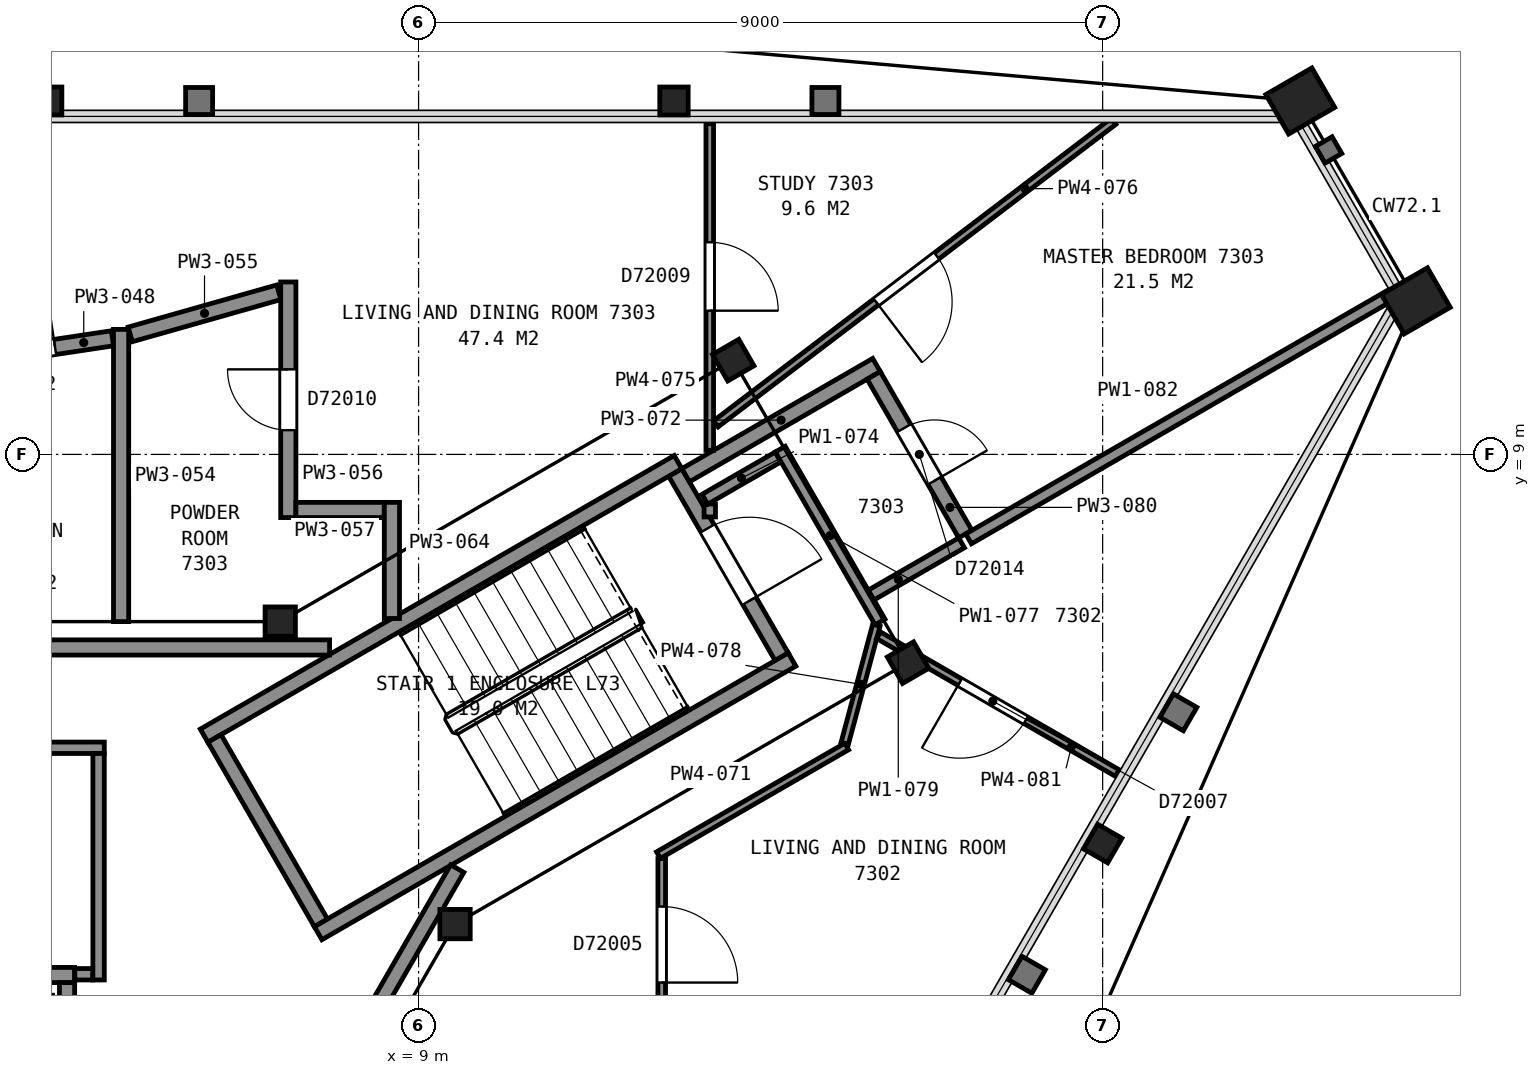
"""IFC4 building model, lengths in metres.
Left out: names, types, materials, properties, quantities, classifications, styles, units other than length and angle.
Written with IfcOpenShell. Run it as: python <this file> out.ifc"""

import sys

from ifc_helpers import new_model, si_unit, direction, frame, frame_2d, origin, origin_2d, place, context, subcontext, project, spatial, rectangle, hollow_rectangle, i_section, extrude, element, fill, save


model = new_model("IFC4")
c1 = context("Model", 3, precision=1e-05, world=origin(), true_north=direction((0.0, 1.0)))
c2 = subcontext(c1, "Body", "Model", "MODEL_VIEW")
j1 = project(units=[si_unit("LENGTHUNIT", "METRE"), si_unit("PLANEANGLEUNIT", "RADIAN")], contexts=[c1])
p1 = place(None, origin())
s1 = spatial("IfcSite", under=j1, at=p1, CompositionType="ELEMENT")
p2 = place(p1, origin())
s2 = spatial("IfcBuilding", under=s1, at=p2, CompositionType="ELEMENT")
p3 = place(p2, frame((0.0, 0.0, 289.9)))
s3 = spatial("IfcBuildingStorey", under=s2, at=p3, CompositionType="ELEMENT", Elevation=289.9)
p4 = place(p3, frame((20.6, 13.65, 0.0), z_axis=(0.0, 0.0, 1.0), x_axis=(0.5, -0.866025403784, 0.0)))
e1 = element("IfcColumn", 1, at=p4, inside=s3, PredefinedType="COLUMN", context=c2, shape_type="SweptSolid", body=[
    extrude(hollow_rectangle(XDim=0.6, YDim=0.7, WallThickness=0.04, at=origin_2d()), origin(), (0.0, 0.0, 1.0), 3.7),
])
for number, where, z_axis, x_axis in (
    (2, (12.36, 13.65, 0.0), (0.0, 0.0, 1.0), (1.0, 0.0, 0.0)),
    (3, (4.12, 13.65, 0.0), (0.0, 0.0, 1.0), (1.0, 0.0, 0.0)),
    (4, (18.0, 3.88, 0.0), (0.0, 0.0, 1.0), (-0.5, -0.866, 0.0)),
):
    element("IfcColumn", number, at=place(p3, frame(where, z_axis=z_axis, x_axis=x_axis)), inside=s3, PredefinedType="COLUMN", context=c2, shape_type="SweptSolid", body=[
        extrude(i_section(OverallWidth=0.373, OverallDepth=0.368, WebThickness=0.015, FlangeThickness=0.024, FilletRadius=0.015, at=origin_2d()), origin(), (0.0, 0.0, 1.0), 3.7),
    ])
p5 = place(p3, frame((22.12, 11.02, 0.0), z_axis=(0.0, 0.0, 1.0), x_axis=(0.5, -0.866025403784, 0.0)))
e5 = element("IfcColumn", 5, at=p5, inside=s3, PredefinedType="COLUMN", context=c2, shape_type="SweptSolid", body=[
    extrude(hollow_rectangle(XDim=0.6, YDim=0.7, WallThickness=0.04, at=origin_2d()), origin(), (0.0, 0.0, 1.0), 3.7),
])
p6 = place(p3, frame((9.48, 2.82, 0.0), z_axis=(0.0, 0.0, 1.0), x_axis=(1.0, 0.0, 0.0)))
e6 = element("IfcColumn", 6, at=p6, inside=s3, PredefinedType="COLUMN", context=c2, shape_type="SweptSolid", body=[
    extrude(i_section(OverallWidth=0.399, OverallDepth=0.386, WebThickness=0.021, FlangeThickness=0.033, FilletRadius=0.015, at=origin_2d()), origin(), (0.0, 0.0, 1.0), 3.7),
])
for number, where, z_axis, x_axis in (
    (7, (15.44, 6.26, 0.0), (0.0, 0.0, 1.0), (0.5, -0.866, 0.0)),
    (8, (13.14, 10.24, 0.0), (0.0, 0.0, 1.0), (0.5, -0.866, 0.0)),
):
    element("IfcColumn", number, at=place(p3, frame(where, z_axis=z_axis, x_axis=x_axis)), inside=s3, PredefinedType="COLUMN", context=c2, shape_type="SweptSolid", body=[
        extrude(i_section(OverallWidth=0.401, OverallDepth=0.399, WebThickness=0.025, FlangeThickness=0.04, FilletRadius=0.015, at=origin_2d()), origin(), (0.0, 0.0, 1.0), 3.7),
    ])
p7 = place(p3, frame((7.18, 6.8, 0.0), z_axis=(0.0, 0.0, 1.0), x_axis=(1.0, 0.0, 0.0)))
e9 = element("IfcColumn", 9, at=p7, inside=s3, PredefinedType="COLUMN", context=c2, shape_type="SweptSolid", body=[
    extrude(i_section(OverallWidth=0.399, OverallDepth=0.386, WebThickness=0.021, FlangeThickness=0.033, FilletRadius=0.015, at=origin_2d()), origin(), (0.0, 0.0, 1.0), 3.7),
])
p8 = place(p3, frame((13.777, 6.338, 0.0), z_axis=(0.0, 0.0, 1.0), x_axis=(-0.500049511043, 0.865996816683, 0.0)))
e10 = element("IfcWall", 10, at=p8, inside=s3, PredefinedType="PARTITIONING", context=c2, shape_type="SweptSolid", body=[
    extrude(rectangle(XDim=2.8, YDim=0.2, at=frame_2d((1.4, 0.0))), origin(), (0.0, 0.0, 1.0), 3.45),
])
p9 = place(p8, frame((0.85, 0.0, 0.0)))
e11 = element("IfcOpeningElement", 11, at=p9, cuts=e10, PredefinedType="OPENING", context=c2, shape_type="SweptSolid", body=[
    extrude(rectangle(XDim=1.1, YDim=2.1, at=frame_2d((0.55, 1.05))), frame((0.0, 0.11, 0.0), z_axis=(0.0, -1.0, 0.0), x_axis=(1.0, 0.0, 0.0)), (0.0, 0.0, 1.0), 0.22),
])
for number, where, z_axis, x_axis in (
    (12, (6.178, 5.299, 0.0), (0.0, 0.0, 1.0), (0.866, 0.5, 0.0)),
    (13, (7.678, 2.701, 0.0), (0.0, 0.0, 1.0), (0.866, 0.5, 0.0)),
):
    element("IfcWall", number, at=place(p3, frame(where, z_axis=z_axis, x_axis=x_axis)), inside=s3, PredefinedType="PARTITIONING", context=c2, shape_type="SweptSolid", body=[
        extrude(rectangle(XDim=7.2, YDim=0.2, at=frame_2d((3.6, 0.0))), origin(), (0.0, 0.0, 1.0), 3.45),
    ])
p10 = place(p3, frame((7.715, 2.838, 0.0), z_axis=(0.0, 0.0, 1.0), x_axis=(-0.500049511043, 0.865996816683, 0.0)))
e14 = element("IfcWall", 14, at=p10, inside=s3, PredefinedType="PARTITIONING", context=c2, shape_type="SweptSolid", body=[
    extrude(rectangle(XDim=2.8, YDim=0.2, at=frame_2d((1.4, 0.0))), origin(), (0.0, 0.0, 1.0), 3.45),
])
p11 = place(p3, frame((1.525, 2.15, 0.0), z_axis=(0.0, 0.0, 1.0), x_axis=(1.0, 0.0, 0.0)))
e15 = element("IfcWall", 15, at=p11, inside=s3, PredefinedType="PARTITIONING", context=c2, shape_type="SweptSolid", body=[
    extrude(rectangle(XDim=2.95, YDim=0.2, at=frame_2d((1.475, 0.0))), origin(), (0.0, 0.0, 1.0), 3.7),
])
p12 = place(p11, frame((0.925, 0.0, 0.0)))
e16 = element("IfcOpeningElement", 16, at=p12, cuts=e15, PredefinedType="OPENING", context=c2, shape_type="SweptSolid", body=[
    extrude(rectangle(XDim=1.1, YDim=2.1, at=frame_2d((0.55, 1.05))), frame((0.0, 0.11, 0.0), z_axis=(0.0, -1.0, 0.0), x_axis=(1.0, 0.0, 0.0)), (0.0, 0.0, 1.0), 0.22),
])
p13 = place(p3, frame((4.375, 0.1, 0.0), z_axis=(0.0, 0.0, 1.0), x_axis=(0.0, 1.0, 0.0)))
e17 = element("IfcWall", 17, at=p13, inside=s3, PredefinedType="PARTITIONING", context=c2, shape_type="SweptSolid", body=[
    extrude(rectangle(XDim=1.95, YDim=0.2, at=frame_2d((0.975, 0.0))), origin(), (0.0, 0.0, 1.0), 3.7),
])
p14 = place(p3, frame((7.829, 6.46, 0.0), z_axis=(0.0, 0.0, 1.0), x_axis=(-1.0, 0.0, 0.0)))
e18 = element("IfcWall", 18, at=p14, inside=s3, PredefinedType="PARTITIONING", context=c2, shape_type="SweptSolid", body=[
    extrude(rectangle(XDim=15.658, YDim=0.2, at=frame_2d((7.829, 0.0))), origin(), (0.0, 0.0, 1.0), 3.45),
])
p15 = place(p14, frame((12.168, 0.0, 0.0)))
e19 = element("IfcOpeningElement", 19, at=p15, cuts=e18, PredefinedType="OPENING", context=c2, shape_type="SweptSolid", body=[
    extrude(rectangle(XDim=1.2, YDim=2.1, at=frame_2d((0.6, 1.05))), frame((0.0, 0.11, 0.0), z_axis=(0.0, -1.0, 0.0), x_axis=(1.0, 0.0, 0.0)), (0.0, 0.0, 1.0), 0.22),
])
p16 = place(p3, frame((-0.245, 5.14, 0.0), z_axis=(0.0, 0.0, 1.0), x_axis=(1.0, 0.0, 0.0)))
e20 = element("IfcWall", 20, at=p16, inside=s3, PredefinedType="PARTITIONING", context=c2, shape_type="SweptSolid", body=[
    extrude(rectangle(XDim=5.11, YDim=0.15, at=frame_2d((2.555, 0.0))), origin(), (0.0, 0.0, 1.0), 3.45),
])
p17 = place(p16, frame((1.975, 0.0, 0.0)))
e21 = element("IfcOpeningElement", 21, at=p17, cuts=e20, PredefinedType="OPENING", context=c2, shape_type="SweptSolid", body=[
    extrude(rectangle(XDim=1.0, YDim=2.1, at=frame_2d((0.5, 1.05))), frame((0.0, 0.085, 0.0), z_axis=(0.0, -1.0, 0.0), x_axis=(1.0, 0.0, 0.0)), (0.0, 0.0, 1.0), 0.17),
])
p18 = place(p3, frame((3.828, -6.29, 0.0), z_axis=(0.0, 0.0, 1.0), x_axis=(0.499979739078, 0.866037101117, 0.0)))
e22 = element("IfcWall", 22, at=p18, inside=s3, PredefinedType="PARTITIONING", context=c2, shape_type="SweptSolid", body=[
    extrude(rectangle(XDim=11.363, YDim=0.2, at=frame_2d((5.681, 0.0))), origin(), (0.0, 0.0, 1.0), 3.45),
])
p19 = place(p18, frame((0.55, 0.0, 0.0)))
e23 = element("IfcOpeningElement", 23, at=p19, cuts=e22, PredefinedType="OPENING", context=c2, shape_type="SweptSolid", body=[
    extrude(rectangle(XDim=1.2, YDim=2.1, at=frame_2d((0.6, 1.05))), frame((0.0, 0.11, 0.0), z_axis=(0.0, -1.0, 0.0), x_axis=(1.0, 0.0, 0.0)), (0.0, 0.0, 1.0), 0.22),
])
p20 = place(p3, frame((4.477, 2.16, 0.0), z_axis=(0.0, 0.0, 1.0), x_axis=(1.0, 0.0, 0.0)))
e24 = element("IfcWall", 24, at=p20, inside=s3, PredefinedType="PARTITIONING", context=c2, shape_type="SweptSolid", body=[
    extrude(rectangle(XDim=0.238, YDim=0.15, at=frame_2d((0.119, 0.0))), origin(), (0.0, 0.0, 1.0), 3.45),
])
p21 = place(p3, frame((4.79, 2.085, 0.0), z_axis=(0.0, 0.0, 1.0), x_axis=(0.0, 1.0, 0.0)))
e25 = element("IfcWall", 25, at=p21, inside=s3, PredefinedType="PARTITIONING", context=c2, shape_type="SweptSolid", body=[
    extrude(rectangle(XDim=2.98, YDim=0.15, at=frame_2d((1.49, 0.0))), origin(), (0.0, 0.0, 1.0), 3.45),
])
p22 = place(p3, frame((4.972, 10.528, 0.0), z_axis=(0.0, 0.0, 1.0), x_axis=(-0.988827119235, -0.149066858374, 0.0)))
e26 = element("IfcWall", 26, at=p22, inside=s3, PredefinedType="PARTITIONING", context=c2, shape_type="SweptSolid", body=[
    extrude(rectangle(XDim=2.399, YDim=0.2, at=frame_2d((1.2, 0.0))), origin(), (0.0, 0.0, 1.0), 2.723),
])
p23 = place(p22, frame((0.764, 0.0, 0.0)))
e27 = element("IfcOpeningElement", 27, at=p23, cuts=e26, PredefinedType="OPENING", context=c2, shape_type="SweptSolid", body=[
    extrude(rectangle(XDim=0.9, YDim=2.1, at=frame_2d((0.45, 1.05))), frame((0.0, 0.11, 0.0), z_axis=(0.0, -1.0, 0.0), x_axis=(1.0, 0.0, 0.0)), (0.0, 0.0, 1.0), 0.22),
])
p24 = place(p3, frame((5.086, 6.8, 0.0), z_axis=(0.0, 0.0, 1.0), x_axis=(0.0, 1.0, 0.0)))
e28 = element("IfcWall", 28, at=p24, inside=s3, PredefinedType="PARTITIONING", context=c2, shape_type="SweptSolid", body=[
    extrude(rectangle(XDim=3.845, YDim=0.2, at=frame_2d((1.922, 0.0))), origin(), (0.0, 0.0, 1.0), 2.723),
])
p25 = place(p3, frame((5.206, 10.579, 0.0), z_axis=(0.0, 0.0, 1.0), x_axis=(0.962043687615, 0.272895480212, 0.0)))
e29 = element("IfcWall", 29, at=p25, inside=s3, PredefinedType="PARTITIONING", context=c2, shape_type="SweptSolid", body=[
    extrude(rectangle(XDim=2.032, YDim=0.2, at=frame_2d((1.016, 0.0))), origin(), (0.0, 0.0, 1.0), 2.723),
])
p26 = place(p3, frame((7.286, 8.169, 0.0), z_axis=(0.0, 0.0, 1.0), x_axis=(0.0, 1.0, 0.0)))
e30 = element("IfcWall", 30, at=p26, inside=s3, PredefinedType="PARTITIONING", context=c2, shape_type="SweptSolid", body=[
    extrude(rectangle(XDim=3.1, YDim=0.2, at=frame_2d((1.55, 0.0))), origin(), (0.0, 0.0, 1.0), 2.723),
])
p27 = place(p26, frame((1.15, 0.0, 0.0)))
e31 = element("IfcOpeningElement", 31, at=p27, cuts=e30, PredefinedType="OPENING", context=c2, shape_type="SweptSolid", body=[
    extrude(rectangle(XDim=0.8, YDim=2.1, at=frame_2d((0.4, 1.05))), frame((0.0, 0.11, 0.0), z_axis=(0.0, -1.0, 0.0), x_axis=(1.0, 0.0, 0.0)), (0.0, 0.0, 1.0), 0.22),
])
p28 = place(p3, frame((7.386, 8.269, 0.0), z_axis=(0.0, 0.0, 1.0), x_axis=(1.0, 0.0, 0.0)))
e32 = element("IfcWall", 32, at=p28, inside=s3, PredefinedType="PARTITIONING", context=c2, shape_type="SweptSolid", body=[
    extrude(rectangle(XDim=1.163, YDim=0.2, at=frame_2d((0.582, 0.0))), origin(), (0.0, 0.0, 1.0), 2.723),
])
p29 = place(p3, frame((8.649, 6.841, 0.0), z_axis=(0.0, 0.0, 1.0), x_axis=(0.0, 1.0, 0.0)))
e33 = element("IfcWall", 33, at=p29, inside=s3, PredefinedType="PARTITIONING", context=c2, shape_type="SweptSolid", body=[
    extrude(rectangle(XDim=1.528, YDim=0.2, at=frame_2d((0.764, 0.0))), origin(), (0.0, 0.0, 1.0), 2.723),
])
p30 = place(p3, frame((12.199, 3.682, 0.0), z_axis=(0.0, 0.0, 1.0), x_axis=(0.0, -1.0, 0.0)))
e34 = element("IfcWall", 34, at=p30, inside=s3, PredefinedType="PARTITIONING", context=c2, shape_type="SweptSolid", body=[
    extrude(rectangle(XDim=2.381, YDim=0.1, at=frame_2d((1.19, 0.0))), origin(), (0.0, 0.0, 1.0), 2.723),
])
p31 = place(p30, frame((0.631, 0.0, 0.0)))
e35 = element("IfcOpeningElement", 35, at=p31, cuts=e34, PredefinedType="OPENING", context=c2, shape_type="SweptSolid", body=[
    extrude(rectangle(XDim=1.0, YDim=2.1, at=frame_2d((0.5, 1.05))), frame((0.0, 0.06, 0.0), z_axis=(0.0, -1.0, 0.0), x_axis=(1.0, 0.0, 0.0)), (0.0, 0.0, 1.0), 0.12),
])
p32 = place(p3, frame((12.156, 3.727, 0.0), z_axis=(0.0, 0.0, 1.0), x_axis=(0.866012137121, 0.500022977831, 0.0)))
e36 = element("IfcWall", 36, at=p32, inside=s3, PredefinedType="PARTITIONING", context=c2, shape_type="SweptSolid", body=[
    extrude(rectangle(XDim=2.86, YDim=0.1, at=frame_2d((1.43, 0.0))), origin(), (0.0, 0.0, 1.0), 2.723),
])
p33 = place(p3, frame((12.514, 8.726, 0.0), z_axis=(0.0, 0.0, 1.0), x_axis=(0.865969617579, 0.500096612097, 0.0)))
e37 = element("IfcWall", 37, at=p33, inside=s3, PredefinedType="PARTITIONING", context=c2, shape_type="SweptSolid", body=[
    extrude(rectangle(XDim=2.899, YDim=0.2, at=frame_2d((1.45, 0.0))), origin(), (0.0, 0.0, 1.0), 2.723),
])
p34 = place(p3, frame((12.831, 8.177, 0.0), z_axis=(0.0, 0.0, 1.0), x_axis=(0.0, 1.0, 0.0)))
e38 = element("IfcWall", 38, at=p34, inside=s3, PredefinedType="PARTITIONING", context=c2, shape_type="SweptSolid", body=[
    extrude(rectangle(XDim=0.17, YDim=0.15, at=frame_2d((0.085, 0.0))), origin(), (0.0, 0.0, 1.0), 2.723),
])
p35 = place(p3, frame((12.766, 8.409, 0.0), z_axis=(0.0, 0.0, 1.0), x_axis=(0.865995823051, 0.500051231833, 0.0)))
e39 = element("IfcWall", 39, at=p35, inside=s3, PredefinedType="PARTITIONING", context=c2, shape_type="SweptSolid", body=[
    extrude(rectangle(XDim=1.114, YDim=0.15, at=frame_2d((0.557, 0.0))), origin(), (0.0, 0.0, 1.0), 2.723),
])
p36 = place(p3, frame((12.831, 13.351, 0.0), z_axis=(0.0, 0.0, 1.0), x_axis=(0.0, -1.0, 0.0)))
e40 = element("IfcWall", 40, at=p36, inside=s3, PredefinedType="PARTITIONING", context=c2, shape_type="SweptSolid", body=[
    extrude(rectangle(XDim=4.298, YDim=0.1, at=frame_2d((2.149, 0.0))), origin(), (0.0, 0.0, 1.0), 2.723),
])
p37 = place(p36, frame((1.56, 0.0, 0.0)))
e41 = element("IfcOpeningElement", 41, at=p37, cuts=e40, PredefinedType="OPENING", context=c2, shape_type="SweptSolid", body=[
    extrude(rectangle(XDim=0.9, YDim=2.1, at=frame_2d((0.45, 1.05))), frame((0.0, 0.06, 0.0), z_axis=(0.0, -1.0, 0.0), x_axis=(1.0, 0.0, 0.0)), (0.0, 0.0, 1.0), 0.12),
])
p38 = place(p3, frame((18.144, 13.383, 0.0), z_axis=(0.0, 0.0, 1.0), x_axis=(-0.795867985115, -0.605470189414, 0.0)))
e42 = element("IfcWall", 42, at=p38, inside=s3, PredefinedType="PARTITIONING", context=c2, shape_type="SweptSolid", body=[
    extrude(rectangle(XDim=6.574, YDim=0.1, at=frame_2d((3.287, 0.0))), origin(), (0.0, 0.0, 1.0), 2.723),
])
p39 = place(p38, frame((2.925, 0.0, 0.0)))
e43 = element("IfcOpeningElement", 43, at=p39, cuts=e42, PredefinedType="OPENING", context=c2, shape_type="SweptSolid", body=[
    extrude(rectangle(XDim=1.0, YDim=2.1, at=frame_2d((0.5, 1.05))), frame((0.0, 0.06, 0.0), z_axis=(0.0, -1.0, 0.0), x_axis=(1.0, 0.0, 0.0)), (0.0, 0.0, 1.0), 0.12),
])
p40 = place(p3, frame((13.759, 9.069, 0.0), z_axis=(0.0, 0.0, 1.0), x_axis=(0.500020344131, -0.866013657776, 0.0)))
e44 = element("IfcWall", 44, at=p40, inside=s3, PredefinedType="PARTITIONING", context=c2, shape_type="SweptSolid", body=[
    extrude(rectangle(XDim=2.625, YDim=0.15, at=frame_2d((1.312, 0.0))), origin(), (0.0, 0.0, 1.0), 2.723),
])
p41 = place(p3, frame((14.607, 5.2, 0.0), z_axis=(0.0, 0.0, 1.0), x_axis=(0.258589257768, 0.965987368327, 0.0)))
e45 = element("IfcWall", 45, at=p41, inside=s3, PredefinedType="PARTITIONING", context=c2, shape_type="SweptSolid", body=[
    extrude(rectangle(XDim=1.607, YDim=0.1, at=frame_2d((0.803, 0.0))), origin(), (0.0, 0.0, 1.0), 2.723),
])
p42 = place(p3, frame((14.954, 7.149, 0.0), z_axis=(0.0, 0.0, 1.0), x_axis=(0.865960792519, 0.5001118933, 0.0)))
e46 = element("IfcWall", 46, at=p42, inside=s3, PredefinedType="PARTITIONING", context=c2, shape_type="SweptSolid", body=[
    extrude(rectangle(XDim=1.375, YDim=0.15, at=frame_2d((0.688, 0.0))), origin(), (0.0, 0.0, 1.0), 2.723),
])
p43 = place(p3, frame((16.194, 7.952, 0.0), z_axis=(0.0, 0.0, 1.0), x_axis=(-0.500125724882, 0.865952804321, 0.0)))
e47 = element("IfcWall", 47, at=p43, inside=s3, PredefinedType="PARTITIONING", context=c2, shape_type="SweptSolid", body=[
    extrude(rectangle(XDim=2.411, YDim=0.2, at=frame_2d((1.205, 0.0))), origin(), (0.0, 0.0, 1.0), 2.723),
])
p44 = place(p43, frame((0.811, 0.0, 0.0)))
e48 = element("IfcOpeningElement", 48, at=p44, cuts=e47, PredefinedType="OPENING", context=c2, shape_type="SweptSolid", body=[
    extrude(rectangle(XDim=0.8, YDim=2.1, at=frame_2d((0.4, 1.05))), frame((0.0, 0.11, 0.0), z_axis=(0.0, -1.0, 0.0), x_axis=(1.0, 0.0, 0.0)), (0.0, 0.0, 1.0), 0.22),
])
p45 = place(p3, frame((15.052, 6.62, 0.0), z_axis=(0.0, 0.0, 1.0), x_axis=(0.866029693906, -0.499992569217, 0.0)))
e49 = element("IfcWall", 49, at=p45, inside=s3, PredefinedType="PARTITIONING", context=c2, shape_type="SweptSolid", body=[
    extrude(rectangle(XDim=3.625, YDim=0.1, at=frame_2d((1.812, 0.0))), origin(), (0.0, 0.0, 1.0), 2.723),
])
p46 = place(p45, frame((1.235, 0.0, 0.0)))
e50 = element("IfcOpeningElement", 50, at=p46, cuts=e49, PredefinedType="OPENING", context=c2, shape_type="SweptSolid", body=[
    extrude(rectangle(XDim=1.0, YDim=2.1, at=frame_2d((0.5, 1.05))), frame((0.0, 0.06, 0.0), z_axis=(0.0, -1.0, 0.0), x_axis=(1.0, 0.0, 0.0)), (0.0, 0.0, 1.0), 0.12),
])
p47 = place(p3, frame((16.236, 7.889, 0.0), z_axis=(0.0, 0.0, 1.0), x_axis=(0.865995456094, 0.500051867335, 0.0)))
e51 = element("IfcWall", 51, at=p47, inside=s3, PredefinedType="PARTITIONING", context=c2, shape_type="SweptSolid", body=[
    extrude(rectangle(XDim=6.415, YDim=0.15, at=frame_2d((3.208, 0.0))), origin(), (0.0, 0.0, 1.0), 2.723),
])
p48 = place(p9, origin())
e52 = element("IfcDoor", 52, at=p48, inside=s3, OperationType="SINGLE_SWING_LEFT", PredefinedType="DOOR", context=c2, shape_type="SweptSolid", body=[
    extrude(rectangle(XDim=1.1, YDim=2.1, at=frame_2d((0.55, 1.05))), frame((0.0, 0.025, 0.0), z_axis=(0.0, -1.0, 0.0), x_axis=(1.0, 0.0, 0.0)), (0.0, 0.0, 1.0), 0.05),
])
fill(e11, e52)
p49 = place(p23, origin())
e53 = element("IfcDoor", 53, at=p49, inside=s3, OperationType="SINGLE_SWING_LEFT", PredefinedType="DOOR", context=c2, shape_type="SweptSolid", body=[
    extrude(rectangle(XDim=0.9, YDim=2.1, at=frame_2d((0.45, 1.05))), frame((0.0, 0.025, 0.0), z_axis=(0.0, -1.0, 0.0), x_axis=(1.0, 0.0, 0.0)), (0.0, 0.0, 1.0), 0.05),
])
fill(e27, e53)
p50 = place(p27, origin())
e54 = element("IfcDoor", 54, at=p50, inside=s3, OperationType="SINGLE_SWING_RIGHT", PredefinedType="DOOR", context=c2, shape_type="SweptSolid", body=[
    extrude(rectangle(XDim=0.8, YDim=2.1, at=frame_2d((0.4, 1.05))), frame((0.0, 0.025, 0.0), z_axis=(0.0, -1.0, 0.0), x_axis=(1.0, 0.0, 0.0)), (0.0, 0.0, 1.0), 0.05),
])
fill(e31, e54)
p51 = place(p31, origin())
e55 = element("IfcDoor", 55, at=p51, inside=s3, OperationType="SINGLE_SWING_RIGHT", PredefinedType="DOOR", context=c2, shape_type="SweptSolid", body=[
    extrude(rectangle(XDim=1.0, YDim=2.1, at=frame_2d((0.5, 1.05))), frame((0.0, 0.025, 0.0), z_axis=(0.0, -1.0, 0.0), x_axis=(1.0, 0.0, 0.0)), (0.0, 0.0, 1.0), 0.05),
])
fill(e35, e55)
p52 = place(p37, origin())
e56 = element("IfcDoor", 56, at=p52, inside=s3, OperationType="SINGLE_SWING_RIGHT", PredefinedType="DOOR", context=c2, shape_type="SweptSolid", body=[
    extrude(rectangle(XDim=0.9, YDim=2.1, at=frame_2d((0.45, 1.05))), frame((0.0, 0.025, 0.0), z_axis=(0.0, -1.0, 0.0), x_axis=(1.0, 0.0, 0.0)), (0.0, 0.0, 1.0), 0.05),
])
fill(e41, e56)
p53 = place(p39, origin())
e57 = element("IfcDoor", 57, at=p53, inside=s3, OperationType="SINGLE_SWING_RIGHT", PredefinedType="DOOR", context=c2, shape_type="SweptSolid", body=[
    extrude(rectangle(XDim=1.0, YDim=2.1, at=frame_2d((0.5, 1.05))), frame((0.0, 0.025, 0.0), z_axis=(0.0, -1.0, 0.0), x_axis=(1.0, 0.0, 0.0)), (0.0, 0.0, 1.0), 0.05),
])
fill(e43, e57)
p54 = place(p44, origin())
e58 = element("IfcDoor", 58, at=p54, inside=s3, OperationType="SINGLE_SWING_LEFT", PredefinedType="DOOR", context=c2, shape_type="SweptSolid", body=[
    extrude(rectangle(XDim=0.8, YDim=2.1, at=frame_2d((0.4, 1.05))), frame((0.0, 0.025, 0.0), z_axis=(0.0, -1.0, 0.0), x_axis=(1.0, 0.0, 0.0)), (0.0, 0.0, 1.0), 0.05),
])
fill(e48, e58)
p55 = place(p46, origin())
e59 = element("IfcDoor", 59, at=p55, inside=s3, OperationType="SINGLE_SWING_LEFT", PredefinedType="DOOR", context=c2, shape_type="SweptSolid", body=[
    extrude(rectangle(XDim=1.0, YDim=2.1, at=frame_2d((0.5, 1.05))), frame((0.0, 0.025, 0.0), z_axis=(0.0, -1.0, 0.0), x_axis=(1.0, 0.0, 0.0)), (0.0, 0.0, 1.0), 0.05),
])
fill(e50, e59)
save(model, sys.argv[1])
